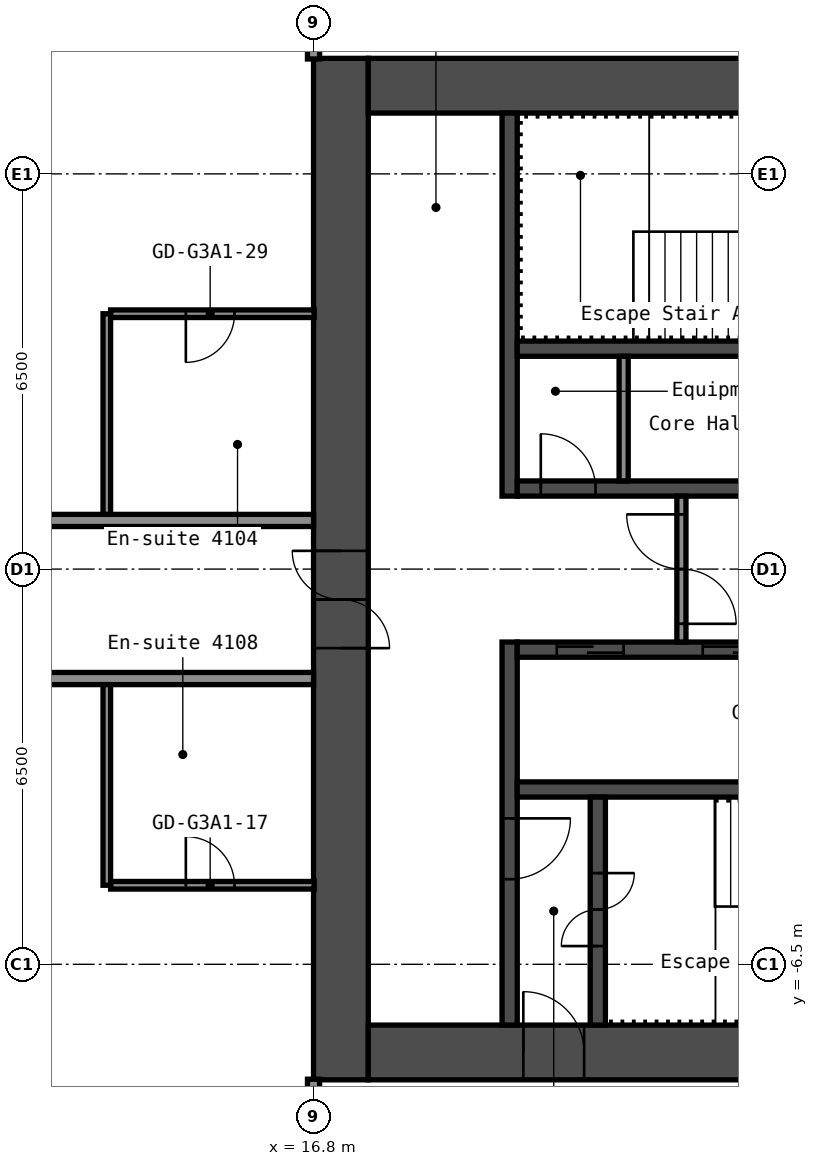
"""IFC4 building model, lengths in metres.
Left out: names, types, materials, properties, quantities, classifications, styles, units other than length and angle.
Written with IfcOpenShell. Run it as: python <this file> out.ifc"""

import sys

from ifc_helpers import new_model, si_unit, direction, frame, frame_2d, origin, place, context, subcontext, project, spatial, rectangle, extrude, element, fill, save


model = new_model("IFC4")
c1 = context("Model", 3, precision=1e-05, world=origin(), true_north=direction((0.0, 1.0)))
c2 = subcontext(c1, "Body", "Model", "MODEL_VIEW")
j1 = project(units=[si_unit("LENGTHUNIT", "METRE"), si_unit("PLANEANGLEUNIT", "RADIAN")], contexts=[c1])
p1 = place(None, origin())
s1 = spatial("IfcSite", under=j1, at=p1, CompositionType="ELEMENT")
p2 = place(p1, origin())
s2 = spatial("IfcBuilding", under=s1, at=p2, CompositionType="ELEMENT")
p3 = place(p2, frame((0.0, 0.0, 147.0)))
s3 = spatial("IfcBuildingStorey", under=s2, at=p3, CompositionType="ELEMENT", Elevation=147.0)
p4 = place(p3, frame((17.25, -8.4, 0.0), z_axis=(0.0, 0.0, 1.0), x_axis=(0.0, 1.0, 0.0)))
e1 = element("IfcWall", 1, at=p4, inside=s3, PredefinedType="SHEAR", context=c2, shape_type="SweptSolid", body=[
    extrude(rectangle(XDim=16.8, YDim=0.9, at=frame_2d((8.4, 0.0))), origin(), (0.0, 0.0, 1.0), 2.75),
])
p5 = place(p4, frame((7.1, 0.0, 0.0)))
e2 = element("IfcOpeningElement", 2, at=p5, cuts=e1, PredefinedType="OPENING", context=c2, shape_type="SweptSolid", body=[
    extrude(rectangle(XDim=1.6, YDim=2.1, at=frame_2d((0.8, 1.05))), frame((0.0, 0.46, 0.0), z_axis=(0.0, -1.0, 0.0), x_axis=(1.0, 0.0, 0.0)), (0.0, 0.0, 1.0), 0.92),
])
p6 = place(p3, frame((17.7, 7.95, 0.0), z_axis=(0.0, 0.0, 1.0), x_axis=(1.0, 0.0, 0.0)))
e3 = element("IfcWall", 3, at=p6, inside=s3, PredefinedType="SHEAR", context=c2, shape_type="SweptSolid", body=[
    extrude(rectangle(XDim=15.0, YDim=0.9, at=frame_2d((7.5, 0.0))), origin(), (0.0, 0.0, 1.0), 2.75),
])
p7 = place(p6, frame((10.4, 0.0, 0.0)))
e4 = element("IfcOpeningElement", 4, at=p7, cuts=e3, PredefinedType="OPENING", context=c2, shape_type="SweptSolid", body=[
    extrude(rectangle(XDim=1.2, YDim=2.1, at=frame_2d((0.6, 1.05))), frame((0.0, 0.46, 0.0), z_axis=(0.0, -1.0, 0.0), x_axis=(1.0, 0.0, 0.0)), (0.0, 0.0, 1.0), 0.92),
])
p8 = place(p6, frame((13.35, 0.0, 0.0)))
e5 = element("IfcOpeningElement", 5, at=p8, cuts=e3, PredefinedType="OPENING", context=c2, shape_type="SweptSolid", body=[
    extrude(rectangle(XDim=0.9, YDim=2.1, at=frame_2d((0.45, 1.05))), frame((0.0, 0.46, 0.0), z_axis=(0.0, -1.0, 0.0), x_axis=(1.0, 0.0, 0.0)), (0.0, 0.0, 1.0), 0.92),
])
p9 = place(p3, frame((17.7, -7.95, 0.0), z_axis=(0.0, 0.0, 1.0), x_axis=(1.0, 0.0, 0.0)))
e6 = element("IfcWall", 6, at=p9, inside=s3, PredefinedType="SHEAR", context=c2, shape_type="SweptSolid", body=[
    extrude(rectangle(XDim=15.0, YDim=0.9, at=frame_2d((7.5, 0.0))), origin(), (0.0, 0.0, 1.0), 2.75),
])
p10 = place(p9, frame((2.55, 0.0, 0.0)))
e7 = element("IfcOpeningElement", 7, at=p10, cuts=e6, PredefinedType="OPENING", context=c2, shape_type="SweptSolid", body=[
    extrude(rectangle(XDim=1.0, YDim=2.1, at=frame_2d((0.5, 1.05))), frame((0.0, 0.46, 0.0), z_axis=(0.0, -1.0, 0.0), x_axis=(1.0, 0.0, 0.0)), (0.0, 0.0, 1.0), 0.92),
])
p11 = place(p3, frame((20.025, 1.2, 0.0), z_axis=(0.0, 0.0, 1.0), x_axis=(0.0, 1.0, 0.0)))
e8 = element("IfcWall", 8, at=p11, inside=s3, PredefinedType="SHEAR", context=c2, shape_type="SweptSolid", body=[
    extrude(rectangle(XDim=6.3, YDim=0.25, at=frame_2d((3.15, 0.0))), origin(), (0.0, 0.0, 1.0), 2.75),
])
p12 = place(p3, frame((20.025, -7.5, 0.0), z_axis=(0.0, 0.0, 1.0), x_axis=(0.0, 1.0, 0.0)))
e9 = element("IfcWall", 9, at=p12, inside=s3, PredefinedType="SHEAR", context=c2, shape_type="SweptSolid", body=[
    extrude(rectangle(XDim=6.3, YDim=0.25, at=frame_2d((3.15, 0.0))), origin(), (0.0, 0.0, 1.0), 2.75),
])
p13 = place(p12, frame((2.4, 0.0, 0.0)))
e10 = element("IfcOpeningElement", 10, at=p13, cuts=e9, PredefinedType="OPENING", context=c2, shape_type="SweptSolid", body=[
    extrude(rectangle(XDim=1.0, YDim=2.1, at=frame_2d((0.5, 1.05))), frame((0.0, 0.135, 0.0), z_axis=(0.0, -1.0, 0.0), x_axis=(1.0, 0.0, 0.0)), (0.0, 0.0, 1.0), 0.27),
])
p14 = place(p3, frame((20.15, 1.325, 0.0), z_axis=(0.0, 0.0, 1.0), x_axis=(1.0, 0.0, 0.0)))
e11 = element("IfcWall", 11, at=p14, inside=s3, PredefinedType="SHEAR", context=c2, shape_type="SweptSolid", body=[
    extrude(rectangle(XDim=7.5, YDim=0.25, at=frame_2d((3.75, 0.0))), origin(), (0.0, 0.0, 1.0), 2.75),
])
p15 = place(p14, frame((0.387, 0.0, 0.0)))
e12 = element("IfcOpeningElement", 12, at=p15, cuts=e11, PredefinedType="OPENING", context=c2, shape_type="SweptSolid", body=[
    extrude(rectangle(XDim=0.9, YDim=2.1, at=frame_2d((0.45, 1.05))), frame((0.0, 0.135, 0.0), z_axis=(0.0, -1.0, 0.0), x_axis=(1.0, 0.0, 0.0)), (0.0, 0.0, 1.0), 0.27),
])
p16 = place(p14, frame((4.087, 0.0, 0.0)))
e13 = element("IfcOpeningElement", 13, at=p16, cuts=e11, PredefinedType="OPENING", context=c2, shape_type="SweptSolid", body=[
    extrude(rectangle(XDim=0.9, YDim=2.1, at=frame_2d((0.45, 1.05))), frame((0.0, 0.135, 0.0), z_axis=(0.0, -1.0, 0.0), x_axis=(1.0, 0.0, 0.0)), (0.0, 0.0, 1.0), 0.27),
])
p17 = place(p3, frame((20.15, 3.625, 0.0), z_axis=(0.0, 0.0, 1.0), x_axis=(1.0, 0.0, 0.0)))
e14 = element("IfcWall", 14, at=p17, inside=s3, PredefinedType="SHEAR", context=c2, shape_type="SweptSolid", body=[
    extrude(rectangle(XDim=7.5, YDim=0.25, at=frame_2d((3.75, 0.0))), origin(), (0.0, 0.0, 1.0), 2.75),
])
p18 = place(p3, frame((20.15, -1.325, 0.0), z_axis=(0.0, 0.0, 1.0), x_axis=(1.0, 0.0, 0.0)))
e15 = element("IfcWall", 15, at=p18, inside=s3, PredefinedType="SHEAR", context=c2, shape_type="SweptSolid", body=[
    extrude(rectangle(XDim=7.5, YDim=0.25, at=frame_2d((3.75, 0.0))), origin(), (0.0, 0.0, 1.0), 2.75),
])
p19 = place(p18, frame((0.65, 0.0, 0.0)))
e16 = element("IfcOpeningElement", 16, at=p19, cuts=e15, PredefinedType="OPENING", context=c2, shape_type="SweptSolid", body=[
    extrude(rectangle(XDim=1.1, YDim=2.1, at=frame_2d((0.55, 1.05))), frame((0.0, 0.135, 0.0), z_axis=(0.0, -1.0, 0.0), x_axis=(1.0, 0.0, 0.0)), (0.0, 0.0, 1.0), 0.27),
])
p20 = place(p18, frame((3.05, 0.0, 0.0)))
e17 = element("IfcOpeningElement", 17, at=p20, cuts=e15, PredefinedType="OPENING", context=c2, shape_type="SweptSolid", body=[
    extrude(rectangle(XDim=1.1, YDim=2.1, at=frame_2d((0.55, 1.05))), frame((0.0, 0.135, 0.0), z_axis=(0.0, -1.0, 0.0), x_axis=(1.0, 0.0, 0.0)), (0.0, 0.0, 1.0), 0.27),
])
p21 = place(p18, frame((5.45, 0.0, 0.0)))
e18 = element("IfcOpeningElement", 18, at=p21, cuts=e15, PredefinedType="OPENING", context=c2, shape_type="SweptSolid", body=[
    extrude(rectangle(XDim=1.1, YDim=2.1, at=frame_2d((0.55, 1.05))), frame((0.0, 0.135, 0.0), z_axis=(0.0, -1.0, 0.0), x_axis=(1.0, 0.0, 0.0)), (0.0, 0.0, 1.0), 0.27),
])
p22 = place(p3, frame((20.15, -3.625, 0.0), z_axis=(0.0, 0.0, 1.0), x_axis=(1.0, 0.0, 0.0)))
e19 = element("IfcWall", 19, at=p22, inside=s3, PredefinedType="SHEAR", context=c2, shape_type="SweptSolid", body=[
    extrude(rectangle(XDim=7.5, YDim=0.25, at=frame_2d((3.75, 0.0))), origin(), (0.0, 0.0, 1.0), 2.75),
])
p23 = place(p3, frame((21.475, -7.5, 0.0), z_axis=(0.0, 0.0, 1.0), x_axis=(0.0, 1.0, 0.0)))
e20 = element("IfcWall", 20, at=p23, inside=s3, PredefinedType="SHEAR", context=c2, shape_type="SweptSolid", body=[
    extrude(rectangle(XDim=3.75, YDim=0.25, at=frame_2d((1.875, 0.0))), origin(), (0.0, 0.0, 1.0), 2.75),
])
p24 = place(p23, frame((1.3, 0.0, 0.0)))
e21 = element("IfcOpeningElement", 21, at=p24, cuts=e20, PredefinedType="OPENING", context=c2, shape_type="SweptSolid", body=[
    extrude(rectangle(XDim=1.2, YDim=2.1, at=frame_2d((0.6, 1.05))), frame((0.0, 0.135, 0.0), z_axis=(0.0, -1.0, 0.0), x_axis=(1.0, 0.0, 0.0)), (0.0, 0.0, 1.0), 0.27),
])
p25 = place(p3, frame((22.85, -1.2, 0.0), z_axis=(0.0, 0.0, 1.0), x_axis=(0.0, 1.0, 0.0)))
e22 = element("IfcWall", 22, at=p25, inside=s3, PredefinedType="PARTITIONING", context=c2, shape_type="SweptSolid", body=[
    extrude(rectangle(XDim=2.4, YDim=0.15, at=frame_2d((1.2, 0.0))), origin(), (0.0, 0.0, 1.0), 2.75),
])
p26 = place(p25, frame((0.3, 0.0, 0.0)))
e23 = element("IfcOpeningElement", 23, at=p26, cuts=e22, PredefinedType="OPENING", context=c2, shape_type="SweptSolid", body=[
    extrude(rectangle(XDim=1.8, YDim=2.1, at=frame_2d((0.9, 1.05))), frame((0.0, 0.085, 0.0), z_axis=(0.0, -1.0, 0.0), x_axis=(1.0, 0.0, 0.0)), (0.0, 0.0, 1.0), 0.17),
])
p27 = place(p3, frame((21.9, 1.45, 0.0), z_axis=(0.0, 0.0, 1.0), x_axis=(0.0, 1.0, 0.0)))
e24 = element("IfcWall", 24, at=p27, inside=s3, PredefinedType="PARTITIONING", context=c2, shape_type="SweptSolid", body=[
    extrude(rectangle(XDim=2.05, YDim=0.15, at=frame_2d((1.025, 0.0))), origin(), (0.0, 0.0, 1.0), 2.75),
])
p28 = place(p3, frame((13.462, -5.2, 0.0), z_axis=(0.0, 0.0, 1.0), x_axis=(1.0, 0.0, 0.0)))
e25 = element("IfcWall", 25, at=p28, inside=s3, PredefinedType="PARTITIONING", context=c2, shape_type="SweptSolid", body=[
    extrude(rectangle(XDim=3.348, YDim=0.125, at=frame_2d((1.674, 0.0))), origin(), (0.0, 0.0, 1.0), 2.75),
])
p29 = place(p28, frame((1.238, 0.0, 0.0)))
e26 = element("IfcOpeningElement", 26, at=p29, cuts=e25, PredefinedType="OPENING", context=c2, shape_type="SweptSolid", body=[
    extrude(rectangle(XDim=0.8, YDim=2.1, at=frame_2d((0.4, 1.05))), frame((0.0, 0.073, 0.0), z_axis=(0.0, -1.0, 0.0), x_axis=(1.0, 0.0, 0.0)), (0.0, 0.0, 1.0), 0.145),
])
p30 = place(p3, frame((-16.8, -1.8, 0.0), z_axis=(0.0, 0.0, 1.0), x_axis=(1.0, 0.0, 0.0)))
e27 = element("IfcWall", 27, at=p30, inside=s3, PredefinedType="PARTITIONING", context=c2, shape_type="SweptSolid", body=[
    extrude(rectangle(XDim=33.6, YDim=0.2, at=frame_2d((16.8, 0.0))), origin(), (0.0, 0.0, 1.0), 2.75),
])
p31 = place(p30, frame((5.5, 0.0, 0.0)))
e28 = element("IfcOpeningElement", 28, at=p31, cuts=e27, PredefinedType="OPENING", context=c2, shape_type="SweptSolid", body=[
    extrude(rectangle(XDim=1.0, YDim=2.1, at=frame_2d((0.5, 1.05))), frame((0.0, 0.11, 0.0), z_axis=(0.0, -1.0, 0.0), x_axis=(1.0, 0.0, 0.0)), (0.0, 0.0, 1.0), 0.22),
])
p32 = place(p30, frame((9.8, 0.0, 0.0)))
e29 = element("IfcOpeningElement", 29, at=p32, cuts=e27, PredefinedType="OPENING", context=c2, shape_type="SweptSolid", body=[
    extrude(rectangle(XDim=0.9, YDim=2.1, at=frame_2d((0.45, 1.05))), frame((0.0, 0.11, 0.0), z_axis=(0.0, -1.0, 0.0), x_axis=(1.0, 0.0, 0.0)), (0.0, 0.0, 1.0), 0.22),
])
p33 = place(p30, frame((14.0, 0.0, 0.0)))
e30 = element("IfcOpeningElement", 30, at=p33, cuts=e27, PredefinedType="OPENING", context=c2, shape_type="SweptSolid", body=[
    extrude(rectangle(XDim=0.9, YDim=2.1, at=frame_2d((0.45, 1.05))), frame((0.0, 0.11, 0.0), z_axis=(0.0, -1.0, 0.0), x_axis=(1.0, 0.0, 0.0)), (0.0, 0.0, 1.0), 0.22),
])
p34 = place(p30, frame((18.8, 0.0, 0.0)))
e31 = element("IfcOpeningElement", 31, at=p34, cuts=e27, PredefinedType="OPENING", context=c2, shape_type="SweptSolid", body=[
    extrude(rectangle(XDim=1.0, YDim=2.1, at=frame_2d((0.5, 1.05))), frame((0.0, 0.11, 0.0), z_axis=(0.0, -1.0, 0.0), x_axis=(1.0, 0.0, 0.0)), (0.0, 0.0, 1.0), 0.22),
])
p35 = place(p30, frame((27.2, 0.0, 0.0)))
e32 = element("IfcOpeningElement", 32, at=p35, cuts=e27, PredefinedType="OPENING", context=c2, shape_type="SweptSolid", body=[
    extrude(rectangle(XDim=1.0, YDim=2.1, at=frame_2d((0.5, 1.05))), frame((0.0, 0.11, 0.0), z_axis=(0.0, -1.0, 0.0), x_axis=(1.0, 0.0, 0.0)), (0.0, 0.0, 1.0), 0.22),
])
p36 = place(p3, frame((-16.8, 0.8, 0.0), z_axis=(0.0, 0.0, 1.0), x_axis=(1.0, 0.0, 0.0)))
e33 = element("IfcWall", 33, at=p36, inside=s3, PredefinedType="PARTITIONING", context=c2, shape_type="SweptSolid", body=[
    extrude(rectangle(XDim=33.6, YDim=0.2, at=frame_2d((16.8, 0.0))), origin(), (0.0, 0.0, 1.0), 2.75),
])
p37 = place(p36, frame((2.0, 0.0, 0.0)))
e34 = element("IfcOpeningElement", 34, at=p37, cuts=e33, PredefinedType="OPENING", context=c2, shape_type="SweptSolid", body=[
    extrude(rectangle(XDim=1.0, YDim=2.1, at=frame_2d((0.5, 1.05))), frame((0.0, 0.11, 0.0), z_axis=(0.0, -1.0, 0.0), x_axis=(1.0, 0.0, 0.0)), (0.0, 0.0, 1.0), 0.22),
])
p38 = place(p36, frame((12.1, 0.0, 0.0)))
e35 = element("IfcOpeningElement", 35, at=p38, cuts=e33, PredefinedType="OPENING", context=c2, shape_type="SweptSolid", body=[
    extrude(rectangle(XDim=1.0, YDim=2.1, at=frame_2d((0.5, 1.05))), frame((0.0, 0.11, 0.0), z_axis=(0.0, -1.0, 0.0), x_axis=(1.0, 0.0, 0.0)), (0.0, 0.0, 1.0), 0.22),
])
p39 = place(p36, frame((18.7, 0.0, 0.0)))
e36 = element("IfcOpeningElement", 36, at=p39, cuts=e33, PredefinedType="OPENING", context=c2, shape_type="SweptSolid", body=[
    extrude(rectangle(XDim=0.9, YDim=2.1, at=frame_2d((0.45, 1.05))), frame((0.0, 0.11, 0.0), z_axis=(0.0, -1.0, 0.0), x_axis=(1.0, 0.0, 0.0)), (0.0, 0.0, 1.0), 0.22),
])
p40 = place(p36, frame((22.9, 0.0, 0.0)))
e37 = element("IfcOpeningElement", 37, at=p40, cuts=e33, PredefinedType="OPENING", context=c2, shape_type="SweptSolid", body=[
    extrude(rectangle(XDim=0.9, YDim=2.1, at=frame_2d((0.45, 1.05))), frame((0.0, 0.11, 0.0), z_axis=(0.0, -1.0, 0.0), x_axis=(1.0, 0.0, 0.0)), (0.0, 0.0, 1.0), 0.22),
])
p41 = place(p36, frame((27.2, 0.0, 0.0)))
e38 = element("IfcOpeningElement", 38, at=p41, cuts=e33, PredefinedType="OPENING", context=c2, shape_type="SweptSolid", body=[
    extrude(rectangle(XDim=1.0, YDim=2.1, at=frame_2d((0.5, 1.05))), frame((0.0, 0.11, 0.0), z_axis=(0.0, -1.0, 0.0), x_axis=(1.0, 0.0, 0.0)), (0.0, 0.0, 1.0), 0.22),
])
p42 = place(p3, frame((13.462, 4.2, 0.0), z_axis=(0.0, 0.0, 1.0), x_axis=(1.0, 0.0, 0.0)))
e39 = element("IfcWall", 39, at=p42, inside=s3, PredefinedType="PARTITIONING", context=c2, shape_type="SweptSolid", body=[
    extrude(rectangle(XDim=3.348, YDim=0.125, at=frame_2d((1.674, 0.0))), origin(), (0.0, 0.0, 1.0), 2.75),
])
p43 = place(p42, frame((1.238, 0.0, 0.0)))
e40 = element("IfcOpeningElement", 40, at=p43, cuts=e39, PredefinedType="OPENING", context=c2, shape_type="SweptSolid", body=[
    extrude(rectangle(XDim=0.8, YDim=2.1, at=frame_2d((0.4, 1.05))), frame((0.0, 0.073, 0.0), z_axis=(0.0, -1.0, 0.0), x_axis=(1.0, 0.0, 0.0)), (0.0, 0.0, 1.0), 0.145),
])
for number, where, z_axis, x_axis in (
    (41, (13.4, -5.2, 0.0), (0.0, 0.0, 1.0), (0.0, 1.0, 0.0)),
    (42, (13.4, 0.9, 0.0), (0.0, 0.0, 1.0), (0.0, 1.0, 0.0)),
):
    element("IfcWall", number, at=place(p3, frame(where, z_axis=z_axis, x_axis=x_axis)), inside=s3, PredefinedType="PARTITIONING", context=c2, shape_type="SweptSolid", body=[
        extrude(rectangle(XDim=3.3, YDim=0.125, at=frame_2d((1.65, 0.0))), origin(), (0.0, 0.0, 1.0), 2.75),
    ])
p44 = place(p3, frame((16.8, -19.3, 0.0), z_axis=(0.0, 0.0, 1.0), x_axis=(0.0, 1.0, 0.0)))
e43 = element("IfcWall", 43, at=p44, inside=s3, PredefinedType="PARTITIONING", context=c2, shape_type="SweptSolid", body=[
    extrude(rectangle(XDim=10.91, YDim=0.2, at=frame_2d((5.455, 0.0))), origin(), (0.0, 0.0, 1.0), 2.75),
])
p45 = place(p3, frame((16.8, 8.39, 0.0), z_axis=(0.0, 0.0, 1.0), x_axis=(0.0, 1.0, 0.0)))
e44 = element("IfcWall", 44, at=p45, inside=s3, PredefinedType="PARTITIONING", context=c2, shape_type="SweptSolid", body=[
    extrude(rectangle(XDim=9.91, YDim=0.2, at=frame_2d((4.955, 0.0))), origin(), (0.0, 0.0, 1.0), 2.75),
])
p46 = place(p5, origin())
e45 = element("IfcDoor", 45, at=p46, inside=s3, OperationType="DOUBLE_DOOR_SINGLE_SWING", PredefinedType="DOOR", context=c2, shape_type="SweptSolid", body=[
    extrude(rectangle(XDim=1.6, YDim=2.1, at=frame_2d((0.8, 1.05))), frame((0.0, 0.025, 0.0), z_axis=(0.0, -1.0, 0.0), x_axis=(1.0, 0.0, 0.0)), (0.0, 0.0, 1.0), 0.05),
])
fill(e2, e45)
p47 = place(p10, origin())
e46 = element("IfcDoor", 46, at=p47, inside=s3, OperationType="SINGLE_SWING_RIGHT", PredefinedType="DOOR", context=c2, shape_type="SweptSolid", body=[
    extrude(rectangle(XDim=1.0, YDim=2.1, at=frame_2d((0.5, 1.05))), frame((0.0, 0.025, 0.0), z_axis=(0.0, -1.0, 0.0), x_axis=(1.0, 0.0, 0.0)), (0.0, 0.0, 1.0), 0.05),
])
fill(e7, e46)
p48 = place(p24, origin())
e47 = element("IfcDoor", 47, at=p48, inside=s3, OperationType="DOUBLE_DOOR_SINGLE_SWING", PredefinedType="DOOR", context=c2, shape_type="SweptSolid", body=[
    extrude(rectangle(XDim=1.2, YDim=2.1, at=frame_2d((0.6, 1.05))), frame((0.0, 0.025, 0.0), z_axis=(0.0, -1.0, 0.0), x_axis=(1.0, 0.0, 0.0)), (0.0, 0.0, 1.0), 0.05),
])
fill(e21, e47)
p49 = place(p13, origin())
e48 = element("IfcDoor", 48, at=p49, inside=s3, OperationType="SINGLE_SWING_RIGHT", PredefinedType="DOOR", context=c2, shape_type="SweptSolid", body=[
    extrude(rectangle(XDim=1.0, YDim=2.1, at=frame_2d((0.5, 1.05))), frame((0.0, 0.025, 0.0), z_axis=(0.0, -1.0, 0.0), x_axis=(1.0, 0.0, 0.0)), (0.0, 0.0, 1.0), 0.05),
])
fill(e10, e48)
p50 = place(p26, origin())
e49 = element("IfcDoor", 49, at=p50, inside=s3, OperationType="DOUBLE_DOOR_SINGLE_SWING", PredefinedType="DOOR", context=c2, shape_type="SweptSolid", body=[
    extrude(rectangle(XDim=1.8, YDim=2.1, at=frame_2d((0.9, 1.05))), frame((0.0, 0.025, 0.0), z_axis=(0.0, -1.0, 0.0), x_axis=(1.0, 0.0, 0.0)), (0.0, 0.0, 1.0), 0.05),
])
fill(e23, e49)
p51 = place(p15, origin())
e50 = element("IfcDoor", 50, at=p51, inside=s3, OperationType="SINGLE_SWING_RIGHT", PredefinedType="DOOR", context=c2, shape_type="SweptSolid", body=[
    extrude(rectangle(XDim=0.9, YDim=2.1, at=frame_2d((0.45, 1.05))), frame((0.0, 0.025, 0.0), z_axis=(0.0, -1.0, 0.0), x_axis=(1.0, 0.0, 0.0)), (0.0, 0.0, 1.0), 0.05),
])
fill(e12, e50)
p52 = place(p19, origin())
e51 = element("IfcDoor", 51, at=p52, inside=s3, OperationType="DOUBLE_DOOR_SLIDING", PredefinedType="DOOR", context=c2, shape_type="SweptSolid", body=[
    extrude(rectangle(XDim=1.1, YDim=2.1, at=frame_2d((0.55, 1.05))), frame((0.0, 0.025, 0.0), z_axis=(0.0, -1.0, 0.0), x_axis=(1.0, 0.0, 0.0)), (0.0, 0.0, 1.0), 0.05),
])
fill(e16, e51)
p53 = place(p20, origin())
e52 = element("IfcDoor", 52, at=p53, inside=s3, OperationType="DOUBLE_DOOR_SLIDING", PredefinedType="DOOR", context=c2, shape_type="SweptSolid", body=[
    extrude(rectangle(XDim=1.1, YDim=2.1, at=frame_2d((0.55, 1.05))), frame((0.0, 0.025, 0.0), z_axis=(0.0, -1.0, 0.0), x_axis=(1.0, 0.0, 0.0)), (0.0, 0.0, 1.0), 0.05),
])
fill(e17, e52)
p54 = place(p29, origin())
e53 = element("IfcDoor", 53, at=p54, inside=s3, OperationType="SINGLE_SWING_RIGHT", PredefinedType="DOOR", context=c2, shape_type="SweptSolid", body=[
    extrude(rectangle(XDim=0.8, YDim=2.1, at=frame_2d((0.4, 1.05))), frame((0.0, 0.025, 0.0), z_axis=(0.0, -1.0, 0.0), x_axis=(1.0, 0.0, 0.0)), (0.0, 0.0, 1.0), 0.05),
])
fill(e26, e53)
p55 = place(p43, origin())
e54 = element("IfcDoor", 54, at=p55, inside=s3, OperationType="SINGLE_SWING_LEFT", PredefinedType="DOOR", context=c2, shape_type="SweptSolid", body=[
    extrude(rectangle(XDim=0.8, YDim=2.1, at=frame_2d((0.4, 1.05))), frame((0.0, 0.025, 0.0), z_axis=(0.0, -1.0, 0.0), x_axis=(1.0, 0.0, 0.0)), (0.0, 0.0, 1.0), 0.05),
])
fill(e40, e54)
save(model, sys.argv[1])
